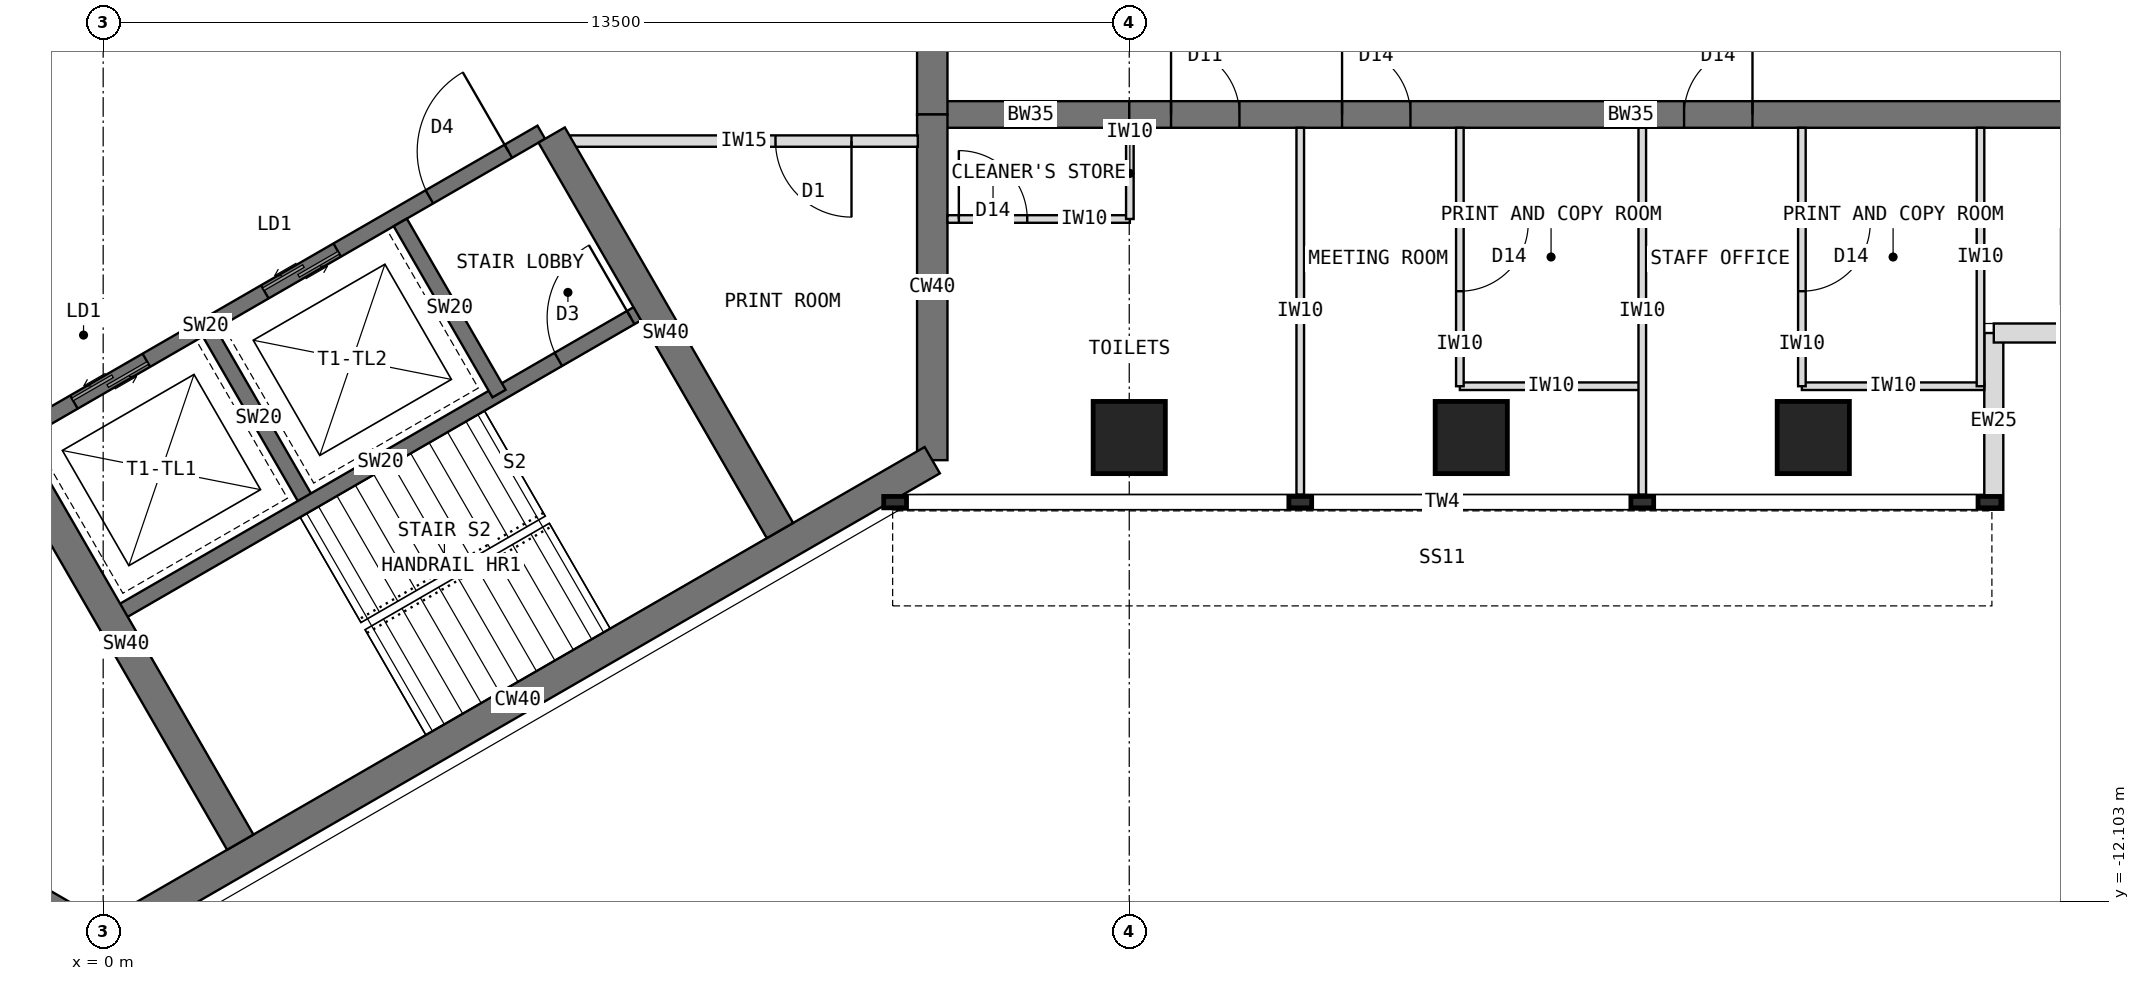
"""IFC4 building model, lengths in metres.
Left out: names, types, materials, properties, quantities, classifications, styles, units other than length and angle.
Written with IfcOpenShell. Run it as: python <this file> out.ifc"""

import sys

from ifc_helpers import new_model, si_unit, direction, frame, frame_2d, origin, origin_2d, place, context, subcontext, project, spatial, rectangle, extrude, element, fill, save


model = new_model("IFC4")
c1 = context("Model", 3, precision=1e-05, world=origin(), true_north=direction((0.0, 1.0)))
c2 = subcontext(c1, "Body", "Model", "MODEL_VIEW")
j1 = project(units=[si_unit("LENGTHUNIT", "METRE"), si_unit("PLANEANGLEUNIT", "RADIAN")], contexts=[c1])
p1 = place(None, origin())
s1 = spatial("IfcSite", under=j1, at=p1, CompositionType="ELEMENT")
p2 = place(p1, origin())
s2 = spatial("IfcBuilding", under=s1, at=p2, CompositionType="ELEMENT")
p3 = place(p2, frame((0.0, 0.0, 279.5)))
s3 = spatial("IfcBuildingStorey", under=s2, at=p3, CompositionType="ELEMENT", Elevation=279.5)
p4 = place(p3, frame((10.908, -6.298, 0.0), z_axis=(0.0, 0.0, 1.0), x_axis=(0.0, 1.0, 0.0)))
e1 = element("IfcWall", 1, at=p4, inside=s3, PredefinedType="SHEAR", context=c2, shape_type="SweptSolid", body=[
    extrude(rectangle(XDim=4.548, YDim=0.4, at=frame_2d((2.274, 0.0))), origin(), (0.0, 0.0, 1.0), 4.0),
])
p5 = place(p3, frame((10.908, -1.75, 0.0), z_axis=(0.0, 0.0, 1.0), x_axis=(0.0, 1.0, 0.0)))
e2 = element("IfcWall", 2, at=p5, inside=s3, PredefinedType="SHEAR", context=c2, shape_type="SweptSolid", body=[
    extrude(rectangle(XDim=3.5, YDim=0.4, at=frame_2d((1.75, 0.0))), origin(), (0.0, 0.0, 1.0), 4.0),
])
p6 = place(p5, frame((0.85, 0.0, 0.0)))
e3 = element("IfcOpeningElement", 3, at=p6, cuts=e2, PredefinedType="OPENING", context=c2, shape_type="SweptSolid", body=[
    extrude(rectangle(XDim=1.8, YDim=2.1, at=frame_2d((0.9, 1.05))), frame((0.0, 0.21, 0.0), z_axis=(0.0, -1.0, 0.0), x_axis=(1.0, 0.0, 0.0)), (0.0, 0.0, 1.0), 0.42),
])
p7 = place(p3, frame((-3.939, -10.322, 0.0), z_axis=(0.0, 0.0, 1.0), x_axis=(0.866011268655, -0.500024481964, 0.0)))
e4 = element("IfcWall", 4, at=p7, inside=s3, PredefinedType="SHEAR", context=c2, shape_type="SweptSolid", body=[
    extrude(rectangle(XDim=4.548, YDim=0.4, at=frame_2d((2.274, 0.0))), origin(), (0.0, 0.0, 1.0), 4.0),
])
p8 = place(p3, frame((0.0, -12.596, 0.0), z_axis=(0.0, 0.0, 1.0), x_axis=(0.866021940709, 0.500005998175, 0.0)))
e5 = element("IfcWall", 5, at=p8, inside=s3, PredefinedType="SHEAR", context=c2, shape_type="SweptSolid", body=[
    extrude(rectangle(XDim=12.596, YDim=0.4, at=frame_2d((6.298, 0.0))), origin(), (0.0, 0.0, 1.0), 4.0),
])
p9 = place(p3, frame((10.908, -1.75, 0.0), z_axis=(0.0, 0.0, 1.0), x_axis=(1.0, 0.0, 0.0)))
e6 = element("IfcWall", 6, at=p9, inside=s3, PredefinedType="SHEAR", context=c2, shape_type="SweptSolid", body=[
    extrude(rectangle(XDim=2.592, YDim=0.35, at=frame_2d((1.296, 0.0))), origin(), (0.0, 0.0, 1.0), 4.0),
])
p10 = place(p3, frame((13.5, -1.75, 0.0), z_axis=(0.0, 0.0, 1.0), x_axis=(1.0, 0.0, 0.0)))
e7 = element("IfcWall", 7, at=p10, inside=s3, PredefinedType="SHEAR", context=c2, shape_type="SweptSolid", body=[
    extrude(rectangle(XDim=13.2, YDim=0.35, at=frame_2d((6.6, 0.0))), origin(), (0.0, 0.0, 1.0), 4.0),
])
p11 = place(p10, frame((0.55, 0.0, 0.0)))
e8 = element("IfcOpeningElement", 8, at=p11, cuts=e7, PredefinedType="OPENING", context=c2, shape_type="SweptSolid", body=[
    extrude(rectangle(XDim=0.9, YDim=2.1, at=frame_2d((0.45, 1.05))), frame((0.0, 0.185, 0.0), z_axis=(0.0, -1.0, 0.0), x_axis=(1.0, 0.0, 0.0)), (0.0, 0.0, 1.0), 0.37),
])
p12 = place(p10, frame((2.8, 0.0, 0.0)))
e9 = element("IfcOpeningElement", 9, at=p12, cuts=e7, PredefinedType="OPENING", context=c2, shape_type="SweptSolid", body=[
    extrude(rectangle(XDim=0.9, YDim=2.1, at=frame_2d((0.45, 1.05))), frame((0.0, 0.185, 0.0), z_axis=(0.0, -1.0, 0.0), x_axis=(1.0, 0.0, 0.0)), (0.0, 0.0, 1.0), 0.37),
])
p13 = place(p10, frame((7.3, 0.0, 0.0)))
e10 = element("IfcOpeningElement", 10, at=p13, cuts=e7, PredefinedType="OPENING", context=c2, shape_type="SweptSolid", body=[
    extrude(rectangle(XDim=0.9, YDim=2.1, at=frame_2d((0.45, 1.05))), frame((0.0, 0.185, 0.0), z_axis=(0.0, -1.0, 0.0), x_axis=(1.0, 0.0, 0.0)), (0.0, 0.0, 1.0), 0.37),
])
for number, where, z_axis, x_axis in (
    (11, (13.5, -6.0, 0.0), (0.0, 0.0, 1.0), (1.0, 0.0, 0.0)),
    (12, (18.0, -6.0, 0.0), (0.0, 0.0, 1.0), (1.0, 0.0, 0.0)),
    (13, (22.5, -6.0, 0.0), (0.0, 0.0, 1.0), (1.0, 0.0, 0.0)),
):
    element("IfcColumn", number, at=place(p3, frame(where, z_axis=z_axis, x_axis=x_axis)), inside=s3, PredefinedType="COLUMN", context=c2, shape_type="SweptSolid", body=[
        extrude(rectangle(XDim=0.95, YDim=0.95, at=origin_2d()), origin(), (0.0, 0.0, 1.0), 4.0),
    ])
for number, where, z_axis, x_axis in (
    (14, (24.875, -6.95, 0.0), (0.0, 0.0, 1.0), (0.0, 1.0, 0.0)),
    (15, (24.875, -4.625, 0.0), (0.0, 0.0, 1.0), (1.0, 0.0, 0.0)),
):
    element("IfcWall", number, at=place(p3, frame(where, z_axis=z_axis, x_axis=x_axis)), inside=s3, PredefinedType="STANDARD", context=c2, shape_type="SweptSolid", body=[
        extrude(rectangle(XDim=2.325, YDim=0.25, at=frame_2d((1.163, 0.0))), origin(), (0.0, 0.0, 1.0), 3.8),
    ])
p14 = place(p3, frame((-1.164, -5.984, 0.0), z_axis=(0.0, 0.0, 1.0), x_axis=(0.866026010844, 0.49999894854, 0.0)))
e16 = element("IfcWall", 16, at=p14, inside=s3, PredefinedType="SHEAR", context=c2, shape_type="SweptSolid", body=[
    extrude(rectangle(XDim=8.0, YDim=0.2, at=frame_2d((4.0, 0.0))), origin(), (0.0, 0.0, 1.0), 4.0),
])
p15 = place(p14, frame((6.3, 0.0, 0.0)))
e17 = element("IfcOpeningElement", 17, at=p15, cuts=e16, PredefinedType="OPENING", context=c2, shape_type="SweptSolid", body=[
    extrude(rectangle(XDim=1.2, YDim=2.1, at=frame_2d((0.6, 1.05))), frame((0.0, 0.11, 0.0), z_axis=(0.0, -1.0, 0.0), x_axis=(1.0, 0.0, 0.0)), (0.0, 0.0, 1.0), 0.22),
])
p16 = place(p14, frame((0.9, 0.0, 0.0)))
e18 = element("IfcOpeningElement", 18, at=p16, cuts=e16, PredefinedType="OPENING", context=c2, shape_type="SweptSolid", body=[
    extrude(rectangle(XDim=1.1, YDim=2.2, at=frame_2d((0.55, 1.1))), frame((0.0, 0.11, 0.0), z_axis=(0.0, -1.0, 0.0), x_axis=(1.0, 0.0, 0.0)), (0.0, 0.0, 1.0), 0.22),
])
p17 = place(p14, frame((3.8, 0.0, 0.0)))
e19 = element("IfcOpeningElement", 19, at=p17, cuts=e16, PredefinedType="OPENING", context=c2, shape_type="SweptSolid", body=[
    extrude(rectangle(XDim=1.1, YDim=2.2, at=frame_2d((0.55, 1.1))), frame((0.0, 0.11, 0.0), z_axis=(0.0, -1.0, 0.0), x_axis=(1.0, 0.0, 0.0)), (0.0, 0.0, 1.0), 0.22),
])
p18 = place(p3, frame((1.397, -4.62, 0.0), z_axis=(0.0, 0.0, 1.0), x_axis=(0.499936506574, -0.866062058628, 0.0)))
e20 = element("IfcWall", 20, at=p18, inside=s3, PredefinedType="SHEAR", context=c2, shape_type="SweptSolid", body=[
    extrude(rectangle(XDim=2.6, YDim=0.2, at=frame_2d((1.3, 0.0))), origin(), (0.0, 0.0, 1.0), 4.0),
])
p19 = place(p3, frame((3.909, -3.17, 0.0), z_axis=(0.0, 0.0, 1.0), x_axis=(0.49997716683, -0.86603858612, 0.0)))
e21 = element("IfcWall", 21, at=p19, inside=s3, PredefinedType="SHEAR", context=c2, shape_type="SweptSolid", body=[
    extrude(rectangle(XDim=2.6, YDim=0.2, at=frame_2d((1.3, 0.0))), origin(), (0.0, 0.0, 1.0), 4.0),
])
p20 = place(p3, frame((0.186, -8.322, 0.0), z_axis=(0.0, 0.0, 1.0), x_axis=(0.866026010844, 0.49999894854, 0.0)))
e22 = element("IfcWall", 22, at=p20, inside=s3, PredefinedType="SHEAR", context=c2, shape_type="SweptSolid", body=[
    extrude(rectangle(XDim=8.0, YDim=0.2, at=frame_2d((4.0, 0.0))), origin(), (0.0, 0.0, 1.0), 4.0),
])
p21 = place(p20, frame((6.7, 0.0, 0.0)))
e23 = element("IfcOpeningElement", 23, at=p21, cuts=e22, PredefinedType="OPENING", context=c2, shape_type="SweptSolid", body=[
    extrude(rectangle(XDim=1.1, YDim=2.1, at=frame_2d((0.55, 1.05))), frame((0.0, 0.11, 0.0), z_axis=(0.0, -1.0, 0.0), x_axis=(1.0, 0.0, 0.0)), (0.0, 0.0, 1.0), 0.22),
])
for number, where, z_axis, x_axis in (
    (24, (5.901, -2.02, 0.0), (0.0, 0.0, 1.0), (0.5, -0.866, 0.0)),
    (25, (-1.201, -6.12, 0.0), (0.0, 0.0, 1.0), (0.5, -0.866, 0.0)),
):
    element("IfcWall", number, at=place(p3, frame(where, z_axis=z_axis, x_axis=x_axis)), inside=s3, PredefinedType="SHEAR", context=c2, shape_type="SweptSolid", body=[
        extrude(rectangle(XDim=6.008, YDim=0.4, at=frame_2d((3.004, 0.0))), origin(), (0.0, 0.0, 1.0), 4.0),
    ])
for number, where, z_axis, x_axis in (
    (26, (15.75, -1.925, 0.0), (0.0, 0.0, 1.0), (0.0, -1.0, 0.0)),
    (27, (20.25, -1.925, 0.0), (0.0, 0.0, 1.0), (0.0, -1.0, 0.0)),
):
    element("IfcWall", number, at=place(p3, frame(where, z_axis=z_axis, x_axis=x_axis)), inside=s3, PredefinedType="PARTITIONING", context=c2, shape_type="SweptSolid", body=[
        extrude(rectangle(XDim=4.825, YDim=0.1, at=frame_2d((2.413, 0.0))), origin(), (0.0, 0.0, 1.0), 3.8),
    ])
p22 = place(p3, frame((17.85, -5.325, 0.0), z_axis=(0.0, 0.0, 1.0), x_axis=(1.0, 0.0, 0.0)))
e28 = element("IfcWall", 28, at=p22, inside=s3, PredefinedType="PARTITIONING", context=c2, shape_type="SweptSolid", body=[
    extrude(rectangle(XDim=2.4, YDim=0.1, at=frame_2d((1.2, 0.0))), origin(), (0.0, 0.0, 1.0), 3.8),
])
p23 = place(p3, frame((17.85, -1.925, 0.0), z_axis=(0.0, 0.0, 1.0), x_axis=(0.0, -1.0, 0.0)))
e29 = element("IfcWall", 29, at=p23, inside=s3, PredefinedType="PARTITIONING", context=c2, shape_type="SweptSolid", body=[
    extrude(rectangle(XDim=3.4, YDim=0.1, at=frame_2d((1.7, 0.0))), origin(), (0.0, 0.0, 1.0), 3.8),
])
p24 = place(p23, frame((1.25, 0.0, 0.0)))
e30 = element("IfcOpeningElement", 30, at=p24, cuts=e29, PredefinedType="OPENING", context=c2, shape_type="SweptSolid", body=[
    extrude(rectangle(XDim=0.9, YDim=2.1, at=frame_2d((0.45, 1.05))), frame((0.0, 0.06, 0.0), z_axis=(0.0, -1.0, 0.0), x_axis=(1.0, 0.0, 0.0)), (0.0, 0.0, 1.0), 0.12),
])
p25 = place(p3, frame((22.35, -5.325, 0.0), z_axis=(0.0, 0.0, 1.0), x_axis=(1.0, 0.0, 0.0)))
e31 = element("IfcWall", 31, at=p25, inside=s3, PredefinedType="PARTITIONING", context=c2, shape_type="SweptSolid", body=[
    extrude(rectangle(XDim=2.4, YDim=0.1, at=frame_2d((1.2, 0.0))), origin(), (0.0, 0.0, 1.0), 3.8),
])
p26 = place(p3, frame((22.35, -1.925, 0.0), z_axis=(0.0, 0.0, 1.0), x_axis=(0.0, -1.0, 0.0)))
e32 = element("IfcWall", 32, at=p26, inside=s3, PredefinedType="PARTITIONING", context=c2, shape_type="SweptSolid", body=[
    extrude(rectangle(XDim=3.4, YDim=0.1, at=frame_2d((1.7, 0.0))), origin(), (0.0, 0.0, 1.0), 3.8),
])
p27 = place(p26, frame((1.25, 0.0, 0.0)))
e33 = element("IfcOpeningElement", 33, at=p27, cuts=e32, PredefinedType="OPENING", context=c2, shape_type="SweptSolid", body=[
    extrude(rectangle(XDim=0.9, YDim=2.1, at=frame_2d((0.45, 1.05))), frame((0.0, 0.06, 0.0), z_axis=(0.0, -1.0, 0.0), x_axis=(1.0, 0.0, 0.0)), (0.0, 0.0, 1.0), 0.12),
])
p28 = place(p3, frame((24.7, -1.925, 0.0), z_axis=(0.0, 0.0, 1.0), x_axis=(0.0, -1.0, 0.0)))
e34 = element("IfcWall", 34, at=p28, inside=s3, PredefinedType="PARTITIONING", context=c2, shape_type="SweptSolid", body=[
    extrude(rectangle(XDim=3.4, YDim=0.1, at=frame_2d((1.7, 0.0))), origin(), (0.0, 0.0, 1.0), 3.8),
])
p29 = place(p3, frame((11.108, -3.125, 0.0), z_axis=(0.0, 0.0, 1.0), x_axis=(1.0, 0.0, 0.0)))
e35 = element("IfcWall", 35, at=p29, inside=s3, PredefinedType="PARTITIONING", context=c2, shape_type="SweptSolid", body=[
    extrude(rectangle(XDim=2.4, YDim=0.1, at=frame_2d((1.2, 0.0))), origin(), (0.0, 0.0, 1.0), 3.8),
])
p30 = place(p29, frame((0.15, 0.0, 0.0)))
e36 = element("IfcOpeningElement", 36, at=p30, cuts=e35, PredefinedType="OPENING", context=c2, shape_type="SweptSolid", body=[
    extrude(rectangle(XDim=0.9, YDim=2.1, at=frame_2d((0.45, 1.05))), frame((0.0, 0.06, 0.0), z_axis=(0.0, -1.0, 0.0), x_axis=(1.0, 0.0, 0.0)), (0.0, 0.0, 1.0), 0.12),
])
p31 = place(p3, frame((13.508, -1.925, 0.0), z_axis=(0.0, 0.0, 1.0), x_axis=(0.0, -1.0, 0.0)))
e37 = element("IfcWall", 37, at=p31, inside=s3, PredefinedType="PARTITIONING", context=c2, shape_type="SweptSolid", body=[
    extrude(rectangle(XDim=1.2, YDim=0.1, at=frame_2d((0.6, 0.0))), origin(), (0.0, 0.0, 1.0), 3.267),
])
p32 = place(p3, frame((10.718, -2.1, 0.0), z_axis=(0.0, 0.0, 1.0), x_axis=(-1.0, 0.0, 0.0)))
e38 = element("IfcWall", 38, at=p32, inside=s3, PredefinedType="PARTITIONING", context=c2, shape_type="SweptSolid", body=[
    extrude(rectangle(XDim=4.576, YDim=0.15, at=frame_2d((2.288, 0.0))), origin(), (0.0, 0.0, 1.0), 3.8),
])
p33 = place(p32, frame((0.873, 0.0, 0.0)))
e39 = element("IfcOpeningElement", 39, at=p33, cuts=e38, PredefinedType="OPENING", context=c2, shape_type="SweptSolid", body=[
    extrude(rectangle(XDim=1.0, YDim=2.1, at=frame_2d((0.5, 1.05))), frame((0.0, 0.085, 0.0), z_axis=(0.0, -1.0, 0.0), x_axis=(1.0, 0.0, 0.0)), (0.0, 0.0, 1.0), 0.17),
])
p34 = place(p15, origin())
e40 = element("IfcDoor", 40, at=p34, inside=s3, OperationType="SINGLE_SWING_RIGHT", PredefinedType="DOOR", context=c2, shape_type="SweptSolid", body=[
    extrude(rectangle(XDim=1.2, YDim=2.1, at=frame_2d((0.6, 1.05))), frame((0.0, 0.025, 0.0), z_axis=(0.0, -1.0, 0.0), x_axis=(1.0, 0.0, 0.0)), (0.0, 0.0, 1.0), 0.05),
])
fill(e17, e40)
p35 = place(p16, origin())
e41 = element("IfcDoor", 41, at=p35, inside=s3, OperationType="DOUBLE_DOOR_SLIDING", PredefinedType="DOOR", context=c2, shape_type="SweptSolid", body=[
    extrude(rectangle(XDim=1.1, YDim=2.2, at=frame_2d((0.55, 1.1))), frame((0.0, 0.025, 0.0), z_axis=(0.0, -1.0, 0.0), x_axis=(1.0, 0.0, 0.0)), (0.0, 0.0, 1.0), 0.05),
])
fill(e18, e41)
p36 = place(p17, origin())
e42 = element("IfcDoor", 42, at=p36, inside=s3, OperationType="DOUBLE_DOOR_SLIDING", PredefinedType="DOOR", context=c2, shape_type="SweptSolid", body=[
    extrude(rectangle(XDim=1.1, YDim=2.2, at=frame_2d((0.55, 1.1))), frame((0.0, 0.025, 0.0), z_axis=(0.0, -1.0, 0.0), x_axis=(1.0, 0.0, 0.0)), (0.0, 0.0, 1.0), 0.05),
])
fill(e19, e42)
p37 = place(p21, origin())
e43 = element("IfcDoor", 43, at=p37, inside=s3, OperationType="SINGLE_SWING_RIGHT", PredefinedType="DOOR", context=c2, shape_type="SweptSolid", body=[
    extrude(rectangle(XDim=1.1, YDim=2.1, at=frame_2d((0.55, 1.05))), frame((0.0, 0.025, 0.0), z_axis=(0.0, -1.0, 0.0), x_axis=(1.0, 0.0, 0.0)), (0.0, 0.0, 1.0), 0.05),
])
fill(e23, e43)
p38 = place(p24, origin())
e44 = element("IfcDoor", 44, at=p38, inside=s3, OperationType="SINGLE_SWING_LEFT", PredefinedType="DOOR", context=c2, shape_type="SweptSolid", body=[
    extrude(rectangle(XDim=0.9, YDim=2.1, at=frame_2d((0.45, 1.05))), frame((0.0, 0.025, 0.0), z_axis=(0.0, -1.0, 0.0), x_axis=(1.0, 0.0, 0.0)), (0.0, 0.0, 1.0), 0.05),
])
fill(e30, e44)
p39 = place(p27, origin())
e45 = element("IfcDoor", 45, at=p39, inside=s3, OperationType="SINGLE_SWING_LEFT", PredefinedType="DOOR", context=c2, shape_type="SweptSolid", body=[
    extrude(rectangle(XDim=0.9, YDim=2.1, at=frame_2d((0.45, 1.05))), frame((0.0, 0.025, 0.0), z_axis=(0.0, -1.0, 0.0), x_axis=(1.0, 0.0, 0.0)), (0.0, 0.0, 1.0), 0.05),
])
fill(e33, e45)
p40 = place(p30, origin())
e46 = element("IfcDoor", 46, at=p40, inside=s3, OperationType="SINGLE_SWING_LEFT", PredefinedType="DOOR", context=c2, shape_type="SweptSolid", body=[
    extrude(rectangle(XDim=0.9, YDim=2.1, at=frame_2d((0.45, 1.05))), frame((0.0, 0.025, 0.0), z_axis=(0.0, -1.0, 0.0), x_axis=(1.0, 0.0, 0.0)), (0.0, 0.0, 1.0), 0.05),
])
fill(e36, e46)
p41 = place(p33, origin())
e47 = element("IfcDoor", 47, at=p41, inside=s3, OperationType="SINGLE_SWING_LEFT", PredefinedType="DOOR", context=c2, shape_type="SweptSolid", body=[
    extrude(rectangle(XDim=1.0, YDim=2.1, at=frame_2d((0.5, 1.05))), frame((0.0, 0.025, 0.0), z_axis=(0.0, -1.0, 0.0), x_axis=(1.0, 0.0, 0.0)), (0.0, 0.0, 1.0), 0.05),
])
fill(e39, e47)
p42 = place(p11, origin())
e48 = element("IfcDoor", 48, at=p42, inside=s3, OperationType="SINGLE_SWING_LEFT", PredefinedType="DOOR", context=c2, shape_type="SweptSolid", body=[
    extrude(rectangle(XDim=0.9, YDim=2.1, at=frame_2d((0.45, 1.05))), frame((0.0, 0.025, 0.0), z_axis=(0.0, -1.0, 0.0), x_axis=(1.0, 0.0, 0.0)), (0.0, 0.0, 1.0), 0.05),
])
fill(e8, e48)
p43 = place(p12, origin())
e49 = element("IfcDoor", 49, at=p43, inside=s3, OperationType="SINGLE_SWING_LEFT", PredefinedType="DOOR", context=c2, shape_type="SweptSolid", body=[
    extrude(rectangle(XDim=0.9, YDim=2.1, at=frame_2d((0.45, 1.05))), frame((0.0, 0.025, 0.0), z_axis=(0.0, -1.0, 0.0), x_axis=(1.0, 0.0, 0.0)), (0.0, 0.0, 1.0), 0.05),
])
fill(e9, e49)
p44 = place(p13, origin())
e50 = element("IfcDoor", 50, at=p44, inside=s3, OperationType="SINGLE_SWING_RIGHT", PredefinedType="DOOR", context=c2, shape_type="SweptSolid", body=[
    extrude(rectangle(XDim=0.9, YDim=2.1, at=frame_2d((0.45, 1.05))), frame((0.0, 0.025, 0.0), z_axis=(0.0, -1.0, 0.0), x_axis=(1.0, 0.0, 0.0)), (0.0, 0.0, 1.0), 0.05),
])
fill(e10, e50)
save(model, sys.argv[1])
